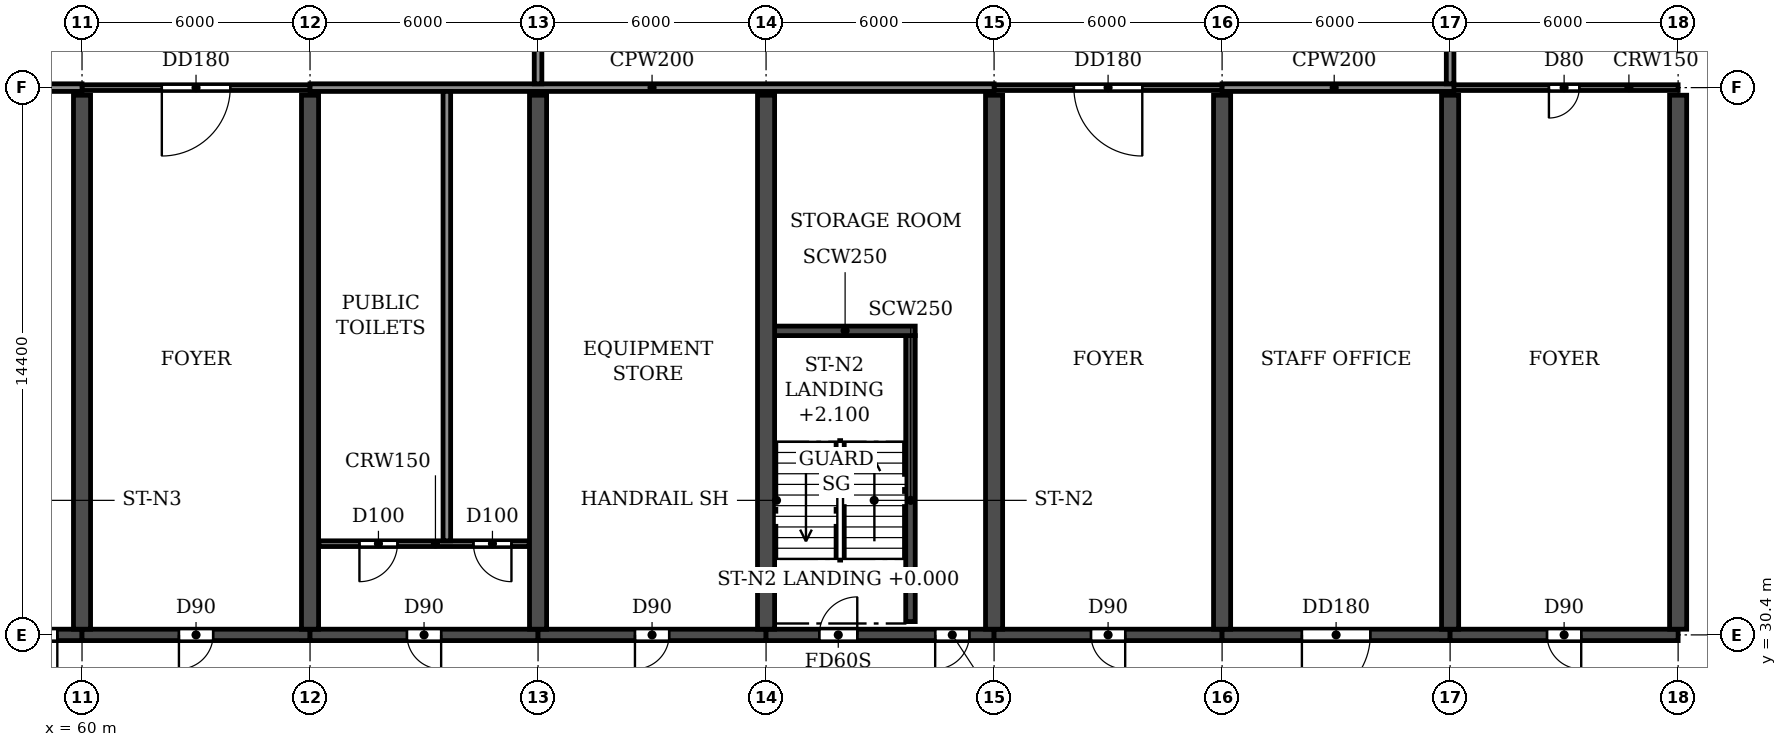
"""IFC4 building model, lengths in metres.
Left out: names, types, materials, properties, quantities, classifications, styles, units other than length and angle.
Written with IfcOpenShell. Run it as: python <this file> out.ifc"""

import sys

from ifc_helpers import new_model, si_unit, direction, frame, frame_2d, origin, place, context, subcontext, project, spatial, rectangle, extrude, element, fill, save


model = new_model("IFC4")
c1 = context("Model", 3, precision=1e-05, world=origin(), true_north=direction((0.0, 1.0)))
c2 = subcontext(c1, "Body", "Model", "MODEL_VIEW")
j1 = project(units=[si_unit("LENGTHUNIT", "METRE"), si_unit("PLANEANGLEUNIT", "RADIAN")], contexts=[c1])
p1 = place(None, origin())
s1 = spatial("IfcSite", under=j1, at=p1, CompositionType="ELEMENT")
p2 = place(p1, origin())
s2 = spatial("IfcBuilding", under=s1, at=p2, CompositionType="ELEMENT")
p3 = place(p2, frame((0.0, 0.0, 15.0)))
s3 = spatial("IfcBuildingStorey", under=s2, at=p3, CompositionType="ELEMENT", Elevation=15.0)
for number, where, z_axis, x_axis in (
    (1, (60.0, 30.55, 0.0), (0.0, 0.0, 1.0), (0.0, 1.0, 0.0)),
    (2, (66.0, 30.55, 0.0), (0.0, 0.0, 1.0), (0.0, 1.0, 0.0)),
    (3, (72.0, 30.55, 0.0), (0.0, 0.0, 1.0), (0.0, 1.0, 0.0)),
    (4, (78.0, 30.55, 0.0), (0.0, 0.0, 1.0), (0.0, 1.0, 0.0)),
    (5, (84.0, 30.55, 0.0), (0.0, 0.0, 1.0), (0.0, 1.0, 0.0)),
    (6, (90.0, 30.55, 0.0), (0.0, 0.0, 1.0), (0.0, 1.0, 0.0)),
    (7, (96.0, 30.55, 0.0), (0.0, 0.0, 1.0), (0.0, 1.0, 0.0)),
    (8, (102.0, 30.55, 0.0), (0.0, 0.0, 1.0), (0.0, 1.0, 0.0)),
):
    element("IfcWall", number, at=place(p3, frame(where, z_axis=z_axis, x_axis=x_axis)), inside=s3, PredefinedType="SHEAR", context=c2, shape_type="SweptSolid", body=[
        extrude(rectangle(XDim=14.05, YDim=0.45, at=frame_2d((7.025, 0.0))), origin(), (0.0, 0.0, 1.0), 3.92),
    ])
p4 = place(p3, frame((54.0, 30.4, 0.0), z_axis=(0.0, 0.0, 1.0), x_axis=(1.0, 0.0, 0.0)))
e9 = element("IfcWall", 9, at=p4, inside=s3, PredefinedType="SHEAR", context=c2, shape_type="SweptSolid", body=[
    extrude(rectangle(XDim=6.0, YDim=0.3, at=frame_2d((3.0, 0.0))), origin(), (0.0, 0.0, 1.0), 3.32),
])
p5 = place(p4, frame((1.4, 0.0, 0.0)))
e10 = element("IfcOpeningElement", 10, at=p5, cuts=e9, PredefinedType="OPENING", context=c2, shape_type="SweptSolid", body=[
    extrude(rectangle(XDim=1.0, YDim=2.1, at=frame_2d((0.5, 1.05))), frame((0.0, 0.16, 0.0), z_axis=(0.0, -1.0, 0.0), x_axis=(1.0, 0.0, 0.0)), (0.0, 0.0, 1.0), 0.32),
])
p6 = place(p4, frame((4.45, 0.0, 0.0)))
e11 = element("IfcOpeningElement", 11, at=p6, cuts=e9, PredefinedType="OPENING", context=c2, shape_type="SweptSolid", body=[
    extrude(rectangle(XDim=0.9, YDim=2.1, at=frame_2d((0.45, 1.05))), frame((0.0, 0.16, 0.0), z_axis=(0.0, -1.0, 0.0), x_axis=(1.0, 0.0, 0.0)), (0.0, 0.0, 1.0), 0.32),
])
p7 = place(p3, frame((60.0, 30.4, 0.0), z_axis=(0.0, 0.0, 1.0), x_axis=(1.0, 0.0, 0.0)))
e12 = element("IfcWall", 12, at=p7, inside=s3, PredefinedType="SHEAR", context=c2, shape_type="SweptSolid", body=[
    extrude(rectangle(XDim=6.0, YDim=0.3, at=frame_2d((3.0, 0.0))), origin(), (0.0, 0.0, 1.0), 3.32),
])
p8 = place(p7, frame((2.55, 0.0, 0.0)))
e13 = element("IfcOpeningElement", 13, at=p8, cuts=e12, PredefinedType="OPENING", context=c2, shape_type="SweptSolid", body=[
    extrude(rectangle(XDim=0.9, YDim=2.1, at=frame_2d((0.45, 1.05))), frame((0.0, 0.16, 0.0), z_axis=(0.0, -1.0, 0.0), x_axis=(1.0, 0.0, 0.0)), (0.0, 0.0, 1.0), 0.32),
])
p9 = place(p3, frame((66.0, 30.4, 0.0), z_axis=(0.0, 0.0, 1.0), x_axis=(1.0, 0.0, 0.0)))
e14 = element("IfcWall", 14, at=p9, inside=s3, PredefinedType="SHEAR", context=c2, shape_type="SweptSolid", body=[
    extrude(rectangle(XDim=6.0, YDim=0.3, at=frame_2d((3.0, 0.0))), origin(), (0.0, 0.0, 1.0), 3.32),
])
p10 = place(p9, frame((2.55, 0.0, 0.0)))
e15 = element("IfcOpeningElement", 15, at=p10, cuts=e14, PredefinedType="OPENING", context=c2, shape_type="SweptSolid", body=[
    extrude(rectangle(XDim=0.9, YDim=2.1, at=frame_2d((0.45, 1.05))), frame((0.0, 0.16, 0.0), z_axis=(0.0, -1.0, 0.0), x_axis=(1.0, 0.0, 0.0)), (0.0, 0.0, 1.0), 0.32),
])
p11 = place(p3, frame((72.0, 30.4, 0.0), z_axis=(0.0, 0.0, 1.0), x_axis=(1.0, 0.0, 0.0)))
e16 = element("IfcWall", 16, at=p11, inside=s3, PredefinedType="SHEAR", context=c2, shape_type="SweptSolid", body=[
    extrude(rectangle(XDim=6.0, YDim=0.3, at=frame_2d((3.0, 0.0))), origin(), (0.0, 0.0, 1.0), 3.32),
])
p12 = place(p11, frame((2.55, 0.0, 0.0)))
e17 = element("IfcOpeningElement", 17, at=p12, cuts=e16, PredefinedType="OPENING", context=c2, shape_type="SweptSolid", body=[
    extrude(rectangle(XDim=0.9, YDim=2.1, at=frame_2d((0.45, 1.05))), frame((0.0, 0.16, 0.0), z_axis=(0.0, -1.0, 0.0), x_axis=(1.0, 0.0, 0.0)), (0.0, 0.0, 1.0), 0.32),
])
p13 = place(p3, frame((78.0, 30.4, 0.0), z_axis=(0.0, 0.0, 1.0), x_axis=(1.0, 0.0, 0.0)))
e18 = element("IfcWall", 18, at=p13, inside=s3, PredefinedType="SHEAR", context=c2, shape_type="SweptSolid", body=[
    extrude(rectangle(XDim=6.0, YDim=0.3, at=frame_2d((3.0, 0.0))), origin(), (0.0, 0.0, 1.0), 3.32),
])
p14 = place(p13, frame((1.4, 0.0, 0.0)))
e19 = element("IfcOpeningElement", 19, at=p14, cuts=e18, PredefinedType="OPENING", context=c2, shape_type="SweptSolid", body=[
    extrude(rectangle(XDim=1.0, YDim=2.1, at=frame_2d((0.5, 1.05))), frame((0.0, 0.16, 0.0), z_axis=(0.0, -1.0, 0.0), x_axis=(1.0, 0.0, 0.0)), (0.0, 0.0, 1.0), 0.32),
])
p15 = place(p13, frame((4.45, 0.0, 0.0)))
e20 = element("IfcOpeningElement", 20, at=p15, cuts=e18, PredefinedType="OPENING", context=c2, shape_type="SweptSolid", body=[
    extrude(rectangle(XDim=0.9, YDim=2.1, at=frame_2d((0.45, 1.05))), frame((0.0, 0.16, 0.0), z_axis=(0.0, -1.0, 0.0), x_axis=(1.0, 0.0, 0.0)), (0.0, 0.0, 1.0), 0.32),
])
p16 = place(p3, frame((84.0, 30.4, 0.0), z_axis=(0.0, 0.0, 1.0), x_axis=(1.0, 0.0, 0.0)))
e21 = element("IfcWall", 21, at=p16, inside=s3, PredefinedType="SHEAR", context=c2, shape_type="SweptSolid", body=[
    extrude(rectangle(XDim=6.0, YDim=0.3, at=frame_2d((3.0, 0.0))), origin(), (0.0, 0.0, 1.0), 3.32),
])
p17 = place(p16, frame((2.55, 0.0, 0.0)))
e22 = element("IfcOpeningElement", 22, at=p17, cuts=e21, PredefinedType="OPENING", context=c2, shape_type="SweptSolid", body=[
    extrude(rectangle(XDim=0.9, YDim=2.1, at=frame_2d((0.45, 1.05))), frame((0.0, 0.16, 0.0), z_axis=(0.0, -1.0, 0.0), x_axis=(1.0, 0.0, 0.0)), (0.0, 0.0, 1.0), 0.32),
])
p18 = place(p3, frame((90.0, 30.4, 0.0), z_axis=(0.0, 0.0, 1.0), x_axis=(1.0, 0.0, 0.0)))
e23 = element("IfcWall", 23, at=p18, inside=s3, PredefinedType="SHEAR", context=c2, shape_type="SweptSolid", body=[
    extrude(rectangle(XDim=6.0, YDim=0.3, at=frame_2d((3.0, 0.0))), origin(), (0.0, 0.0, 1.0), 3.32),
])
p19 = place(p18, frame((2.1, 0.0, 0.0)))
e24 = element("IfcOpeningElement", 24, at=p19, cuts=e23, PredefinedType="OPENING", context=c2, shape_type="SweptSolid", body=[
    extrude(rectangle(XDim=1.8, YDim=2.1, at=frame_2d((0.9, 1.05))), frame((0.0, 0.16, 0.0), z_axis=(0.0, -1.0, 0.0), x_axis=(1.0, 0.0, 0.0)), (0.0, 0.0, 1.0), 0.32),
])
p20 = place(p3, frame((96.0, 30.4, 0.0), z_axis=(0.0, 0.0, 1.0), x_axis=(1.0, 0.0, 0.0)))
e25 = element("IfcWall", 25, at=p20, inside=s3, PredefinedType="SHEAR", context=c2, shape_type="SweptSolid", body=[
    extrude(rectangle(XDim=6.0, YDim=0.3, at=frame_2d((3.0, 0.0))), origin(), (0.0, 0.0, 1.0), 3.32),
])
p21 = place(p20, frame((2.55, 0.0, 0.0)))
e26 = element("IfcOpeningElement", 26, at=p21, cuts=e25, PredefinedType="OPENING", context=c2, shape_type="SweptSolid", body=[
    extrude(rectangle(XDim=0.9, YDim=2.1, at=frame_2d((0.45, 1.05))), frame((0.0, 0.16, 0.0), z_axis=(0.0, -1.0, 0.0), x_axis=(1.0, 0.0, 0.0)), (0.0, 0.0, 1.0), 0.32),
])
p22 = place(p3, frame((81.8, 30.75, 0.0), z_axis=(0.0, 0.0, 1.0), x_axis=(0.0, 1.0, 0.0)))
e27 = element("IfcWall", 27, at=p22, inside=s3, PredefinedType="SOLIDWALL", context=c2, shape_type="SweptSolid", body=[
    extrude(rectangle(XDim=7.525, YDim=0.25, at=frame_2d((3.762, 0.0))), origin(), (0.0, 0.0, 1.0), 3.92),
])
p23 = place(p3, frame((78.0, 38.4, 0.0), z_axis=(0.0, 0.0, 1.0), x_axis=(1.0, 0.0, 0.0)))
e28 = element("IfcWall", 28, at=p23, inside=s3, PredefinedType="SOLIDWALL", context=c2, shape_type="SweptSolid", body=[
    extrude(rectangle(XDim=3.925, YDim=0.25, at=frame_2d((1.962, 0.0))), origin(), (0.0, 0.0, 1.0), 3.92),
])
p24 = place(p3, frame((66.235, 32.8, 0.0), z_axis=(0.0, 0.0, 1.0), x_axis=(1.0, 0.0, 0.0)))
e29 = element("IfcWall", 29, at=p24, inside=s3, PredefinedType="PARTITIONING", context=c2, shape_type="SweptSolid", body=[
    extrude(rectangle(XDim=5.53, YDim=0.15, at=frame_2d((2.765, 0.0))), origin(), (0.0, 0.0, 1.0), 3.92),
])
p25 = place(p24, frame((1.065, 0.0, 0.0)))
e30 = element("IfcOpeningElement", 30, at=p25, cuts=e29, PredefinedType="OPENING", context=c2, shape_type="SweptSolid", body=[
    extrude(rectangle(XDim=1.0, YDim=2.1, at=frame_2d((0.5, 1.05))), frame((0.0, 0.085, 0.0), z_axis=(0.0, -1.0, 0.0), x_axis=(1.0, 0.0, 0.0)), (0.0, 0.0, 1.0), 0.17),
])
p26 = place(p24, frame((4.065, 0.0, 0.0)))
e31 = element("IfcOpeningElement", 31, at=p26, cuts=e29, PredefinedType="OPENING", context=c2, shape_type="SweptSolid", body=[
    extrude(rectangle(XDim=1.0, YDim=2.1, at=frame_2d((0.5, 1.05))), frame((0.0, 0.085, 0.0), z_axis=(0.0, -1.0, 0.0), x_axis=(1.0, 0.0, 0.0)), (0.0, 0.0, 1.0), 0.17),
])
p27 = place(p3, frame((60.0, 44.8, 0.0), z_axis=(0.0, 0.0, 1.0), x_axis=(1.0, 0.0, 0.0)))
e32 = element("IfcWall", 32, at=p27, inside=s3, PredefinedType="PARTITIONING", context=c2, shape_type="SweptSolid", body=[
    extrude(rectangle(XDim=6.0, YDim=0.15, at=frame_2d((3.0, 0.0))), origin(), (0.0, 0.0, 1.0), 3.92),
])
p28 = place(p27, frame((2.1, 0.0, 0.0)))
e33 = element("IfcOpeningElement", 33, at=p28, cuts=e32, PredefinedType="OPENING", context=c2, shape_type="SweptSolid", body=[
    extrude(rectangle(XDim=1.8, YDim=2.1, at=frame_2d((0.9, 1.05))), frame((0.0, 0.085, 0.0), z_axis=(0.0, -1.0, 0.0), x_axis=(1.0, 0.0, 0.0)), (0.0, 0.0, 1.0), 0.17),
])
p29 = place(p3, frame((84.0, 44.8, 0.0), z_axis=(0.0, 0.0, 1.0), x_axis=(1.0, 0.0, 0.0)))
e34 = element("IfcWall", 34, at=p29, inside=s3, PredefinedType="PARTITIONING", context=c2, shape_type="SweptSolid", body=[
    extrude(rectangle(XDim=6.0, YDim=0.15, at=frame_2d((3.0, 0.0))), origin(), (0.0, 0.0, 1.0), 3.92),
])
p30 = place(p29, frame((2.1, 0.0, 0.0)))
e35 = element("IfcOpeningElement", 35, at=p30, cuts=e34, PredefinedType="OPENING", context=c2, shape_type="SweptSolid", body=[
    extrude(rectangle(XDim=1.8, YDim=2.1, at=frame_2d((0.9, 1.05))), frame((0.0, 0.085, 0.0), z_axis=(0.0, -1.0, 0.0), x_axis=(1.0, 0.0, 0.0)), (0.0, 0.0, 1.0), 0.17),
])
p31 = place(p3, frame((95.9, 44.8, 0.0), z_axis=(0.0, 0.0, 1.0), x_axis=(1.0, 0.0, 0.0)))
e36 = element("IfcWall", 36, at=p31, inside=s3, PredefinedType="PARTITIONING", context=c2, shape_type="SweptSolid", body=[
    extrude(rectangle(XDim=6.1, YDim=0.15, at=frame_2d((3.05, 0.0))), origin(), (0.0, 0.0, 1.0), 3.92),
])
p32 = place(p31, frame((2.7, 0.0, 0.0)))
e37 = element("IfcOpeningElement", 37, at=p32, cuts=e36, PredefinedType="OPENING", context=c2, shape_type="SweptSolid", body=[
    extrude(rectangle(XDim=0.8, YDim=2.1, at=frame_2d((0.4, 1.05))), frame((0.0, 0.085, 0.0), z_axis=(0.0, -1.0, 0.0), x_axis=(1.0, 0.0, 0.0)), (0.0, 0.0, 1.0), 0.17),
])
p33 = place(p3, frame((36.0, 44.8, 0.0), z_axis=(0.0, 0.0, 1.0), x_axis=(1.0, 0.0, 0.0)))
e38 = element("IfcWall", 38, at=p33, inside=s3, PredefinedType="PARTITIONING", context=c2, shape_type="SweptSolid", body=[
    extrude(rectangle(XDim=24.0, YDim=0.2, at=frame_2d((12.0, 0.0))), origin(), (0.0, 0.0, 1.0), 3.92),
])
p34 = place(p3, frame((66.0, 44.8, 0.0), z_axis=(0.0, 0.0, 1.0), x_axis=(1.0, 0.0, 0.0)))
e39 = element("IfcWall", 39, at=p34, inside=s3, PredefinedType="PARTITIONING", context=c2, shape_type="SweptSolid", body=[
    extrude(rectangle(XDim=18.0, YDim=0.2, at=frame_2d((9.0, 0.0))), origin(), (0.0, 0.0, 1.0), 3.92),
])
p35 = place(p3, frame((90.0, 44.8, 0.0), z_axis=(0.0, 0.0, 1.0), x_axis=(1.0, 0.0, 0.0)))
e40 = element("IfcWall", 40, at=p35, inside=s3, PredefinedType="PARTITIONING", context=c2, shape_type="SweptSolid", body=[
    extrude(rectangle(XDim=6.1, YDim=0.2, at=frame_2d((3.05, 0.0))), origin(), (0.0, 0.0, 1.0), 3.92),
])
p36 = place(p3, frame((69.6, 32.875, 0.0), z_axis=(0.0, 0.0, 1.0), x_axis=(0.0, 1.0, 0.0)))
e41 = element("IfcWall", 41, at=p36, inside=s3, PredefinedType="PARTITIONING", context=c2, shape_type="SweptSolid", body=[
    extrude(rectangle(XDim=11.825, YDim=0.2, at=frame_2d((5.913, 0.0))), origin(), (0.0, 0.0, 1.0), 3.92),
])
for number, where, z_axis, x_axis in (
    (42, (72.0, 44.9, 0.0), (0.0, 0.0, 1.0), (0.0, 1.0, 0.0)),
    (43, (96.0, 44.9, 0.0), (0.0, 0.0, 1.0), (0.0, 1.0, 0.0)),
):
    element("IfcWall", number, at=place(p3, frame(where, z_axis=z_axis, x_axis=x_axis)), inside=s3, PredefinedType="PARTITIONING", context=c2, shape_type="SweptSolid", body=[
        extrude(rectangle(XDim=11.84, YDim=0.2, at=frame_2d((5.92, 0.0))), origin(), (0.0, 0.0, 1.0), 3.92),
    ])
p37 = place(p6, frame((0.9, 0.0, 0.0), z_axis=(0.0, 0.0, 1.0), x_axis=(-1.0, 0.0, 0.0)))
e44 = element("IfcDoor", 44, at=p37, inside=s3, OperationType="SINGLE_SWING_LEFT", PredefinedType="DOOR", context=c2, shape_type="SweptSolid", body=[
    extrude(rectangle(XDim=0.9, YDim=2.1, at=frame_2d((0.45, 1.05))), frame((0.0, 0.025, 0.0), z_axis=(0.0, -1.0, 0.0), x_axis=(1.0, 0.0, 0.0)), (0.0, 0.0, 1.0), 0.05),
])
fill(e11, e44)
p38 = place(p8, frame((0.9, 0.0, 0.0), z_axis=(0.0, 0.0, 1.0), x_axis=(-1.0, 0.0, 0.0)))
e45 = element("IfcDoor", 45, at=p38, inside=s3, OperationType="SINGLE_SWING_RIGHT", PredefinedType="DOOR", context=c2, shape_type="SweptSolid", body=[
    extrude(rectangle(XDim=0.9, YDim=2.1, at=frame_2d((0.45, 1.05))), frame((0.0, 0.025, 0.0), z_axis=(0.0, -1.0, 0.0), x_axis=(1.0, 0.0, 0.0)), (0.0, 0.0, 1.0), 0.05),
])
fill(e13, e45)
p39 = place(p10, frame((0.9, 0.0, 0.0), z_axis=(0.0, 0.0, 1.0), x_axis=(-1.0, 0.0, 0.0)))
e46 = element("IfcDoor", 46, at=p39, inside=s3, OperationType="SINGLE_SWING_LEFT", PredefinedType="DOOR", context=c2, shape_type="SweptSolid", body=[
    extrude(rectangle(XDim=0.9, YDim=2.1, at=frame_2d((0.45, 1.05))), frame((0.0, 0.025, 0.0), z_axis=(0.0, -1.0, 0.0), x_axis=(1.0, 0.0, 0.0)), (0.0, 0.0, 1.0), 0.05),
])
fill(e15, e46)
p40 = place(p12, frame((0.9, 0.0, 0.0), z_axis=(0.0, 0.0, 1.0), x_axis=(-1.0, 0.0, 0.0)))
e47 = element("IfcDoor", 47, at=p40, inside=s3, OperationType="SINGLE_SWING_RIGHT", PredefinedType="DOOR", context=c2, shape_type="SweptSolid", body=[
    extrude(rectangle(XDim=0.9, YDim=2.1, at=frame_2d((0.45, 1.05))), frame((0.0, 0.025, 0.0), z_axis=(0.0, -1.0, 0.0), x_axis=(1.0, 0.0, 0.0)), (0.0, 0.0, 1.0), 0.05),
])
fill(e17, e47)
p41 = place(p14, origin())
e48 = element("IfcDoor", 48, at=p41, inside=s3, OperationType="SINGLE_SWING_RIGHT", PredefinedType="DOOR", context=c2, shape_type="SweptSolid", body=[
    extrude(rectangle(XDim=1.0, YDim=2.1, at=frame_2d((0.5, 1.05))), frame((0.0, 0.025, 0.0), z_axis=(0.0, -1.0, 0.0), x_axis=(1.0, 0.0, 0.0)), (0.0, 0.0, 1.0), 0.05),
])
fill(e19, e48)
p42 = place(p15, frame((0.9, 0.0, 0.0), z_axis=(0.0, 0.0, 1.0), x_axis=(-1.0, 0.0, 0.0)))
e49 = element("IfcDoor", 49, at=p42, inside=s3, OperationType="SINGLE_SWING_RIGHT", PredefinedType="DOOR", context=c2, shape_type="SweptSolid", body=[
    extrude(rectangle(XDim=0.9, YDim=2.1, at=frame_2d((0.45, 1.05))), frame((0.0, 0.025, 0.0), z_axis=(0.0, -1.0, 0.0), x_axis=(1.0, 0.0, 0.0)), (0.0, 0.0, 1.0), 0.05),
])
fill(e20, e49)
p43 = place(p17, frame((0.9, 0.0, 0.0), z_axis=(0.0, 0.0, 1.0), x_axis=(-1.0, 0.0, 0.0)))
e50 = element("IfcDoor", 50, at=p43, inside=s3, OperationType="SINGLE_SWING_LEFT", PredefinedType="DOOR", context=c2, shape_type="SweptSolid", body=[
    extrude(rectangle(XDim=0.9, YDim=2.1, at=frame_2d((0.45, 1.05))), frame((0.0, 0.025, 0.0), z_axis=(0.0, -1.0, 0.0), x_axis=(1.0, 0.0, 0.0)), (0.0, 0.0, 1.0), 0.05),
])
fill(e22, e50)
p44 = place(p19, frame((1.8, 0.0, 0.0), z_axis=(0.0, 0.0, 1.0), x_axis=(-1.0, 0.0, 0.0)))
e51 = element("IfcDoor", 51, at=p44, inside=s3, OperationType="DOUBLE_DOOR_SINGLE_SWING", PredefinedType="DOOR", context=c2, shape_type="SweptSolid", body=[
    extrude(rectangle(XDim=1.8, YDim=2.1, at=frame_2d((0.9, 1.05))), frame((0.0, 0.025, 0.0), z_axis=(0.0, -1.0, 0.0), x_axis=(1.0, 0.0, 0.0)), (0.0, 0.0, 1.0), 0.05),
])
fill(e24, e51)
p45 = place(p21, frame((0.9, 0.0, 0.0), z_axis=(0.0, 0.0, 1.0), x_axis=(-1.0, 0.0, 0.0)))
e52 = element("IfcDoor", 52, at=p45, inside=s3, OperationType="SINGLE_SWING_LEFT", PredefinedType="DOOR", context=c2, shape_type="SweptSolid", body=[
    extrude(rectangle(XDim=0.9, YDim=2.1, at=frame_2d((0.45, 1.05))), frame((0.0, 0.025, 0.0), z_axis=(0.0, -1.0, 0.0), x_axis=(1.0, 0.0, 0.0)), (0.0, 0.0, 1.0), 0.05),
])
fill(e26, e52)
p46 = place(p25, frame((1.0, 0.0, 0.0), z_axis=(0.0, 0.0, 1.0), x_axis=(-1.0, 0.0, 0.0)))
e53 = element("IfcDoor", 53, at=p46, inside=s3, OperationType="SINGLE_SWING_RIGHT", PredefinedType="DOOR", context=c2, shape_type="SweptSolid", body=[
    extrude(rectangle(XDim=1.0, YDim=2.1, at=frame_2d((0.5, 1.05))), frame((0.0, 0.025, 0.0), z_axis=(0.0, -1.0, 0.0), x_axis=(1.0, 0.0, 0.0)), (0.0, 0.0, 1.0), 0.05),
])
fill(e30, e53)
p47 = place(p26, frame((1.0, 0.0, 0.0), z_axis=(0.0, 0.0, 1.0), x_axis=(-1.0, 0.0, 0.0)))
e54 = element("IfcDoor", 54, at=p47, inside=s3, OperationType="SINGLE_SWING_LEFT", PredefinedType="DOOR", context=c2, shape_type="SweptSolid", body=[
    extrude(rectangle(XDim=1.0, YDim=2.1, at=frame_2d((0.5, 1.05))), frame((0.0, 0.025, 0.0), z_axis=(0.0, -1.0, 0.0), x_axis=(1.0, 0.0, 0.0)), (0.0, 0.0, 1.0), 0.05),
])
fill(e31, e54)
p48 = place(p28, frame((1.8, 0.0, 0.0), z_axis=(0.0, 0.0, 1.0), x_axis=(-1.0, 0.0, 0.0)))
e55 = element("IfcDoor", 55, at=p48, inside=s3, OperationType="DOUBLE_DOOR_SINGLE_SWING", PredefinedType="DOOR", context=c2, shape_type="SweptSolid", body=[
    extrude(rectangle(XDim=1.8, YDim=2.1, at=frame_2d((0.9, 1.05))), frame((0.0, 0.025, 0.0), z_axis=(0.0, -1.0, 0.0), x_axis=(1.0, 0.0, 0.0)), (0.0, 0.0, 1.0), 0.05),
])
fill(e33, e55)
p49 = place(p30, frame((1.8, 0.0, 0.0), z_axis=(0.0, 0.0, 1.0), x_axis=(-1.0, 0.0, 0.0)))
e56 = element("IfcDoor", 56, at=p49, inside=s3, OperationType="DOUBLE_DOOR_SINGLE_SWING", PredefinedType="DOOR", context=c2, shape_type="SweptSolid", body=[
    extrude(rectangle(XDim=1.8, YDim=2.1, at=frame_2d((0.9, 1.05))), frame((0.0, 0.025, 0.0), z_axis=(0.0, -1.0, 0.0), x_axis=(1.0, 0.0, 0.0)), (0.0, 0.0, 1.0), 0.05),
])
fill(e35, e56)
p50 = place(p32, frame((0.8, 0.0, 0.0), z_axis=(0.0, 0.0, 1.0), x_axis=(-1.0, 0.0, 0.0)))
e57 = element("IfcDoor", 57, at=p50, inside=s3, OperationType="SINGLE_SWING_RIGHT", PredefinedType="DOOR", context=c2, shape_type="SweptSolid", body=[
    extrude(rectangle(XDim=0.8, YDim=2.1, at=frame_2d((0.4, 1.05))), frame((0.0, 0.025, 0.0), z_axis=(0.0, -1.0, 0.0), x_axis=(1.0, 0.0, 0.0)), (0.0, 0.0, 1.0), 0.05),
])
fill(e37, e57)
save(model, sys.argv[1])
